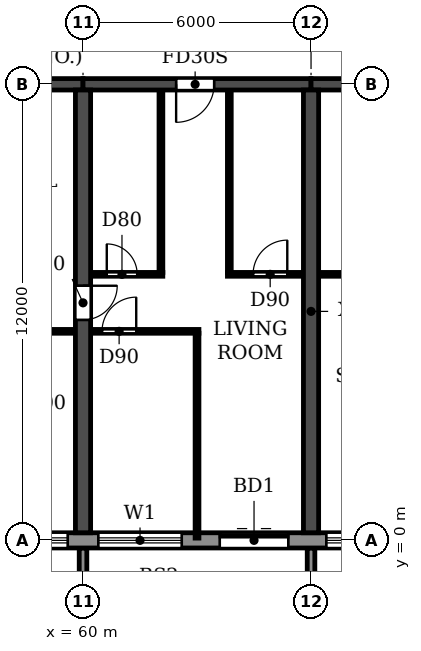
"""IFC4 building model, lengths in metres.
Left out: names, types, materials, properties, quantities, classifications, styles, units other than length and angle.
Written with IfcOpenShell. Run it as: python <this file> out.ifc"""

import sys

from ifc_helpers import new_model, si_unit, direction, frame, frame_2d, origin, place, context, subcontext, project, spatial, polyline, rectangle, outline, extrude, source, transform, mapped, element, fill, save


model = new_model("IFC4")
c1 = context("Model", 3, precision=1e-05, world=origin(), true_north=direction((0.0, 1.0)))
c2 = subcontext(c1, "Body", "Model", "MODEL_VIEW")
j1 = project(units=[si_unit("LENGTHUNIT", "METRE"), si_unit("PLANEANGLEUNIT", "RADIAN")], contexts=[c1])
p1 = place(None, origin())
s1 = spatial("IfcSite", under=j1, at=p1, CompositionType="ELEMENT")
p2 = place(p1, origin())
s2 = spatial("IfcBuilding", under=s1, at=p2, CompositionType="ELEMENT")
p3 = place(p2, frame((0.0, 0.0, 26.7)))
s3 = spatial("IfcBuildingStorey", under=s2, at=p3, CompositionType="ELEMENT", Elevation=26.7)
p4 = place(p3, frame((60.0, 0.2, 0.0), z_axis=(0.0, 0.0, 1.0), x_axis=(0.0, 1.0, 0.0)))
e1 = element("IfcWall", 1, at=p4, inside=s3, PredefinedType="SHEAR", context=c2, shape_type="SweptSolid", body=[
    extrude(rectangle(XDim=11.65, YDim=0.4, at=frame_2d((5.825, 0.0))), origin(), (0.0, 0.0, 1.0), 3.05),
])
p5 = place(p4, frame((5.6, 0.0, 0.0)))
e2 = element("IfcOpeningElement", 2, at=p5, cuts=e1, PredefinedType="OPENING", context=c2, shape_type="SweptSolid", body=[
    extrude(rectangle(XDim=0.9, YDim=2.1, at=frame_2d((0.45, 1.05))), frame((0.0, 0.21, 0.0), z_axis=(0.0, -1.0, 0.0), x_axis=(1.0, 0.0, 0.0)), (0.0, 0.0, 1.0), 0.42),
])
p6 = place(p3, frame((66.0, 0.2, 0.0), z_axis=(0.0, 0.0, 1.0), x_axis=(0.0, 1.0, 0.0)))
e3 = element("IfcWall", 3, at=p6, inside=s3, PredefinedType="SHEAR", context=c2, shape_type="SweptSolid", body=[
    extrude(rectangle(XDim=11.65, YDim=0.4, at=frame_2d((5.825, 0.0))), origin(), (0.0, 0.0, 1.0), 3.05),
])
p7 = place(p3, frame((54.0, 12.0, 0.0), z_axis=(0.0, 0.0, 1.0), x_axis=(1.0, 0.0, 0.0)))
e4 = element("IfcWall", 4, at=p7, inside=s3, PredefinedType="SHEAR", context=c2, shape_type="SweptSolid", body=[
    extrude(rectangle(XDim=6.0, YDim=0.3, at=frame_2d((3.0, 0.0))), origin(), (0.0, 0.0, 1.0), 2.45),
])
p8 = place(p3, frame((60.0, 12.0, 0.0), z_axis=(0.0, 0.0, 1.0), x_axis=(1.0, 0.0, 0.0)))
e5 = element("IfcWall", 5, at=p8, inside=s3, PredefinedType="SHEAR", context=c2, shape_type="SweptSolid", body=[
    extrude(rectangle(XDim=6.0, YDim=0.3, at=frame_2d((3.0, 0.0))), origin(), (0.0, 0.0, 1.0), 2.45),
])
p9 = place(p8, frame((2.45, 0.0, 0.0)))
e6 = element("IfcOpeningElement", 6, at=p9, cuts=e5, PredefinedType="OPENING", context=c2, shape_type="SweptSolid", body=[
    extrude(rectangle(XDim=1.0, YDim=2.1, at=frame_2d((0.5, 1.05))), frame((0.0, 0.16, 0.0), z_axis=(0.0, -1.0, 0.0), x_axis=(1.0, 0.0, 0.0)), (0.0, 0.0, 1.0), 0.32),
])
p10 = place(p3, frame((66.0, 12.0, 0.0), z_axis=(0.0, 0.0, 1.0), x_axis=(1.0, 0.0, 0.0)))
e7 = element("IfcWall", 7, at=p10, inside=s3, PredefinedType="SHEAR", context=c2, shape_type="SweptSolid", body=[
    extrude(rectangle(XDim=6.0, YDim=0.3, at=frame_2d((3.0, 0.0))), origin(), (0.0, 0.0, 1.0), 2.45),
])
p11 = place(p10, frame((2.45, 0.0, 0.0)))
e8 = element("IfcOpeningElement", 8, at=p11, cuts=e7, PredefinedType="OPENING", context=c2, shape_type="SweptSolid", body=[
    extrude(rectangle(XDim=1.0, YDim=2.1, at=frame_2d((0.5, 1.05))), frame((0.0, 0.16, 0.0), z_axis=(0.0, -1.0, 0.0), x_axis=(1.0, 0.0, 0.0)), (0.0, 0.0, 1.0), 0.32),
])
p12 = place(p3, frame((4.683, 0.0, 0.0), z_axis=(0.0, 0.0, 1.0), x_axis=(1.0, 0.0, 0.0)))
e9 = element("IfcWall", 9, at=p12, inside=s3, PredefinedType="STANDARD", context=c2, shape_type="SweptSolid", body=[
    extrude(rectangle(XDim=92.634, YDim=0.4, at=frame_2d((46.317, 0.0))), origin(), (0.0, 0.0, 1.0), 3.05),
])
p13 = place(p12, frame((1.717, 0.0, 0.9)))
e10 = element("IfcOpeningElement", 10, at=p13, cuts=e9, PredefinedType="OPENING", context=c2, shape_type="SweptSolid", body=[
    extrude(rectangle(XDim=2.2, YDim=1.5, at=frame_2d((1.1, 0.75))), frame((0.0, 0.21, 0.0), z_axis=(0.0, -1.0, 0.0), x_axis=(1.0, 0.0, 0.0)), (0.0, 0.0, 1.0), 0.42),
])
p14 = place(p12, frame((4.717, 0.0, 0.9)))
e11 = element("IfcOpeningElement", 11, at=p14, cuts=e9, PredefinedType="OPENING", context=c2, shape_type="SweptSolid", body=[
    extrude(rectangle(XDim=2.2, YDim=1.5, at=frame_2d((1.1, 0.75))), frame((0.0, 0.21, 0.0), z_axis=(0.0, -1.0, 0.0), x_axis=(1.0, 0.0, 0.0)), (0.0, 0.0, 1.0), 0.42),
])
p15 = place(p12, frame((7.717, 0.0, 0.9)))
e12 = element("IfcOpeningElement", 12, at=p15, cuts=e9, PredefinedType="OPENING", context=c2, shape_type="SweptSolid", body=[
    extrude(rectangle(XDim=2.2, YDim=1.5, at=frame_2d((1.1, 0.75))), frame((0.0, 0.21, 0.0), z_axis=(0.0, -1.0, 0.0), x_axis=(1.0, 0.0, 0.0)), (0.0, 0.0, 1.0), 0.42),
])
p16 = place(p12, frame((10.717, 0.0, 0.9)))
e13 = element("IfcOpeningElement", 13, at=p16, cuts=e9, PredefinedType="OPENING", context=c2, shape_type="SweptSolid", body=[
    extrude(rectangle(XDim=2.2, YDim=1.5, at=frame_2d((1.1, 0.75))), frame((0.0, 0.21, 0.0), z_axis=(0.0, -1.0, 0.0), x_axis=(1.0, 0.0, 0.0)), (0.0, 0.0, 1.0), 0.42),
])
p17 = place(p12, frame((13.717, 0.0, 0.9)))
e14 = element("IfcOpeningElement", 14, at=p17, cuts=e9, PredefinedType="OPENING", context=c2, shape_type="SweptSolid", body=[
    extrude(rectangle(XDim=2.2, YDim=1.5, at=frame_2d((1.1, 0.75))), frame((0.0, 0.21, 0.0), z_axis=(0.0, -1.0, 0.0), x_axis=(1.0, 0.0, 0.0)), (0.0, 0.0, 1.0), 0.42),
])
p18 = place(p12, frame((16.717, 0.0, 0.9)))
e15 = element("IfcOpeningElement", 15, at=p18, cuts=e9, PredefinedType="OPENING", context=c2, shape_type="SweptSolid", body=[
    extrude(rectangle(XDim=2.2, YDim=1.5, at=frame_2d((1.1, 0.75))), frame((0.0, 0.21, 0.0), z_axis=(0.0, -1.0, 0.0), x_axis=(1.0, 0.0, 0.0)), (0.0, 0.0, 1.0), 0.42),
])
p19 = place(p12, frame((19.917, 0.0, 0.0)))
e16 = element("IfcOpeningElement", 16, at=p19, cuts=e9, PredefinedType="OPENING", context=c2, shape_type="SweptSolid", body=[
    extrude(rectangle(XDim=1.8, YDim=2.4, at=frame_2d((0.9, 1.2))), frame((0.0, 0.21, 0.0), z_axis=(0.0, -1.0, 0.0), x_axis=(1.0, 0.0, 0.0)), (0.0, 0.0, 1.0), 0.42),
])
p20 = place(p12, frame((22.717, 0.0, 0.9)))
e17 = element("IfcOpeningElement", 17, at=p20, cuts=e9, PredefinedType="OPENING", context=c2, shape_type="SweptSolid", body=[
    extrude(rectangle(XDim=2.2, YDim=1.5, at=frame_2d((1.1, 0.75))), frame((0.0, 0.21, 0.0), z_axis=(0.0, -1.0, 0.0), x_axis=(1.0, 0.0, 0.0)), (0.0, 0.0, 1.0), 0.42),
])
p21 = place(p12, frame((25.717, 0.0, 0.9)))
e18 = element("IfcOpeningElement", 18, at=p21, cuts=e9, PredefinedType="OPENING", context=c2, shape_type="SweptSolid", body=[
    extrude(rectangle(XDim=2.2, YDim=1.5, at=frame_2d((1.1, 0.75))), frame((0.0, 0.21, 0.0), z_axis=(0.0, -1.0, 0.0), x_axis=(1.0, 0.0, 0.0)), (0.0, 0.0, 1.0), 0.42),
])
p22 = place(p12, frame((28.717, 0.0, 0.9)))
e19 = element("IfcOpeningElement", 19, at=p22, cuts=e9, PredefinedType="OPENING", context=c2, shape_type="SweptSolid", body=[
    extrude(rectangle(XDim=2.2, YDim=1.5, at=frame_2d((1.1, 0.75))), frame((0.0, 0.21, 0.0), z_axis=(0.0, -1.0, 0.0), x_axis=(1.0, 0.0, 0.0)), (0.0, 0.0, 1.0), 0.42),
])
p23 = place(p12, frame((31.917, 0.0, 0.0)))
e20 = element("IfcOpeningElement", 20, at=p23, cuts=e9, PredefinedType="OPENING", context=c2, shape_type="SweptSolid", body=[
    extrude(rectangle(XDim=1.8, YDim=2.4, at=frame_2d((0.9, 1.2))), frame((0.0, 0.21, 0.0), z_axis=(0.0, -1.0, 0.0), x_axis=(1.0, 0.0, 0.0)), (0.0, 0.0, 1.0), 0.42),
])
p24 = place(p12, frame((34.717, 0.0, 0.9)))
e21 = element("IfcOpeningElement", 21, at=p24, cuts=e9, PredefinedType="OPENING", context=c2, shape_type="SweptSolid", body=[
    extrude(rectangle(XDim=2.2, YDim=1.5, at=frame_2d((1.1, 0.75))), frame((0.0, 0.21, 0.0), z_axis=(0.0, -1.0, 0.0), x_axis=(1.0, 0.0, 0.0)), (0.0, 0.0, 1.0), 0.42),
])
p25 = place(p12, frame((37.717, 0.0, 0.9)))
e22 = element("IfcOpeningElement", 22, at=p25, cuts=e9, PredefinedType="OPENING", context=c2, shape_type="SweptSolid", body=[
    extrude(rectangle(XDim=2.2, YDim=1.5, at=frame_2d((1.1, 0.75))), frame((0.0, 0.21, 0.0), z_axis=(0.0, -1.0, 0.0), x_axis=(1.0, 0.0, 0.0)), (0.0, 0.0, 1.0), 0.42),
])
p26 = place(p12, frame((40.717, 0.0, 0.9)))
e23 = element("IfcOpeningElement", 23, at=p26, cuts=e9, PredefinedType="OPENING", context=c2, shape_type="SweptSolid", body=[
    extrude(rectangle(XDim=2.2, YDim=1.5, at=frame_2d((1.1, 0.75))), frame((0.0, 0.21, 0.0), z_axis=(0.0, -1.0, 0.0), x_axis=(1.0, 0.0, 0.0)), (0.0, 0.0, 1.0), 0.42),
])
p27 = place(p12, frame((43.917, 0.0, 0.0)))
e24 = element("IfcOpeningElement", 24, at=p27, cuts=e9, PredefinedType="OPENING", context=c2, shape_type="SweptSolid", body=[
    extrude(rectangle(XDim=1.8, YDim=2.4, at=frame_2d((0.9, 1.2))), frame((0.0, 0.21, 0.0), z_axis=(0.0, -1.0, 0.0), x_axis=(1.0, 0.0, 0.0)), (0.0, 0.0, 1.0), 0.42),
])
p28 = place(p12, frame((46.717, 0.0, 0.9)))
e25 = element("IfcOpeningElement", 25, at=p28, cuts=e9, PredefinedType="OPENING", context=c2, shape_type="SweptSolid", body=[
    extrude(rectangle(XDim=2.2, YDim=1.5, at=frame_2d((1.1, 0.75))), frame((0.0, 0.21, 0.0), z_axis=(0.0, -1.0, 0.0), x_axis=(1.0, 0.0, 0.0)), (0.0, 0.0, 1.0), 0.42),
])
p29 = place(p12, frame((49.717, 0.0, 0.9)))
e26 = element("IfcOpeningElement", 26, at=p29, cuts=e9, PredefinedType="OPENING", context=c2, shape_type="SweptSolid", body=[
    extrude(rectangle(XDim=2.2, YDim=1.5, at=frame_2d((1.1, 0.75))), frame((0.0, 0.21, 0.0), z_axis=(0.0, -1.0, 0.0), x_axis=(1.0, 0.0, 0.0)), (0.0, 0.0, 1.0), 0.42),
])
p30 = place(p12, frame((52.717, 0.0, 0.9)))
e27 = element("IfcOpeningElement", 27, at=p30, cuts=e9, PredefinedType="OPENING", context=c2, shape_type="SweptSolid", body=[
    extrude(rectangle(XDim=2.2, YDim=1.5, at=frame_2d((1.1, 0.75))), frame((0.0, 0.21, 0.0), z_axis=(0.0, -1.0, 0.0), x_axis=(1.0, 0.0, 0.0)), (0.0, 0.0, 1.0), 0.42),
])
p31 = place(p12, frame((55.717, 0.0, 0.9)))
e28 = element("IfcOpeningElement", 28, at=p31, cuts=e9, PredefinedType="OPENING", context=c2, shape_type="SweptSolid", body=[
    extrude(rectangle(XDim=2.2, YDim=1.5, at=frame_2d((1.1, 0.75))), frame((0.0, 0.21, 0.0), z_axis=(0.0, -1.0, 0.0), x_axis=(1.0, 0.0, 0.0)), (0.0, 0.0, 1.0), 0.42),
])
p32 = place(p12, frame((58.917, 0.0, 0.0)))
e29 = element("IfcOpeningElement", 29, at=p32, cuts=e9, PredefinedType="OPENING", context=c2, shape_type="SweptSolid", body=[
    extrude(rectangle(XDim=1.8, YDim=2.4, at=frame_2d((0.9, 1.2))), frame((0.0, 0.21, 0.0), z_axis=(0.0, -1.0, 0.0), x_axis=(1.0, 0.0, 0.0)), (0.0, 0.0, 1.0), 0.42),
])
p33 = place(p12, frame((61.717, 0.0, 0.9)))
e30 = element("IfcOpeningElement", 30, at=p33, cuts=e9, PredefinedType="OPENING", context=c2, shape_type="SweptSolid", body=[
    extrude(rectangle(XDim=2.2, YDim=1.5, at=frame_2d((1.1, 0.75))), frame((0.0, 0.21, 0.0), z_axis=(0.0, -1.0, 0.0), x_axis=(1.0, 0.0, 0.0)), (0.0, 0.0, 1.0), 0.42),
])
p34 = place(p12, frame((64.717, 0.0, 0.9)))
e31 = element("IfcOpeningElement", 31, at=p34, cuts=e9, PredefinedType="OPENING", context=c2, shape_type="SweptSolid", body=[
    extrude(rectangle(XDim=2.2, YDim=1.5, at=frame_2d((1.1, 0.75))), frame((0.0, 0.21, 0.0), z_axis=(0.0, -1.0, 0.0), x_axis=(1.0, 0.0, 0.0)), (0.0, 0.0, 1.0), 0.42),
])
p35 = place(p12, frame((67.717, 0.0, 0.9)))
e32 = element("IfcOpeningElement", 32, at=p35, cuts=e9, PredefinedType="OPENING", context=c2, shape_type="SweptSolid", body=[
    extrude(rectangle(XDim=2.2, YDim=1.5, at=frame_2d((1.1, 0.75))), frame((0.0, 0.21, 0.0), z_axis=(0.0, -1.0, 0.0), x_axis=(1.0, 0.0, 0.0)), (0.0, 0.0, 1.0), 0.42),
])
p36 = place(p12, frame((70.917, 0.0, 0.0)))
e33 = element("IfcOpeningElement", 33, at=p36, cuts=e9, PredefinedType="OPENING", context=c2, shape_type="SweptSolid", body=[
    extrude(rectangle(XDim=1.8, YDim=2.4, at=frame_2d((0.9, 1.2))), frame((0.0, 0.21, 0.0), z_axis=(0.0, -1.0, 0.0), x_axis=(1.0, 0.0, 0.0)), (0.0, 0.0, 1.0), 0.42),
])
p37 = place(p12, frame((73.717, 0.0, 0.9)))
e34 = element("IfcOpeningElement", 34, at=p37, cuts=e9, PredefinedType="OPENING", context=c2, shape_type="SweptSolid", body=[
    extrude(rectangle(XDim=2.2, YDim=1.5, at=frame_2d((1.1, 0.75))), frame((0.0, 0.21, 0.0), z_axis=(0.0, -1.0, 0.0), x_axis=(1.0, 0.0, 0.0)), (0.0, 0.0, 1.0), 0.42),
])
p38 = place(p12, frame((76.717, 0.0, 0.9)))
e35 = element("IfcOpeningElement", 35, at=p38, cuts=e9, PredefinedType="OPENING", context=c2, shape_type="SweptSolid", body=[
    extrude(rectangle(XDim=2.2, YDim=1.5, at=frame_2d((1.1, 0.75))), frame((0.0, 0.21, 0.0), z_axis=(0.0, -1.0, 0.0), x_axis=(1.0, 0.0, 0.0)), (0.0, 0.0, 1.0), 0.42),
])
p39 = place(p12, frame((79.717, 0.0, 0.9)))
e36 = element("IfcOpeningElement", 36, at=p39, cuts=e9, PredefinedType="OPENING", context=c2, shape_type="SweptSolid", body=[
    extrude(rectangle(XDim=2.2, YDim=1.5, at=frame_2d((1.1, 0.75))), frame((0.0, 0.21, 0.0), z_axis=(0.0, -1.0, 0.0), x_axis=(1.0, 0.0, 0.0)), (0.0, 0.0, 1.0), 0.42),
])
p40 = place(p12, frame((82.717, 0.0, 0.9)))
e37 = element("IfcOpeningElement", 37, at=p40, cuts=e9, PredefinedType="OPENING", context=c2, shape_type="SweptSolid", body=[
    extrude(rectangle(XDim=2.2, YDim=1.5, at=frame_2d((1.1, 0.75))), frame((0.0, 0.21, 0.0), z_axis=(0.0, -1.0, 0.0), x_axis=(1.0, 0.0, 0.0)), (0.0, 0.0, 1.0), 0.42),
])
p41 = place(p12, frame((85.717, 0.0, 0.9)))
e38 = element("IfcOpeningElement", 38, at=p41, cuts=e9, PredefinedType="OPENING", context=c2, shape_type="SweptSolid", body=[
    extrude(rectangle(XDim=2.2, YDim=1.5, at=frame_2d((1.1, 0.75))), frame((0.0, 0.21, 0.0), z_axis=(0.0, -1.0, 0.0), x_axis=(1.0, 0.0, 0.0)), (0.0, 0.0, 1.0), 0.42),
])
p42 = place(p12, frame((88.717, 0.0, 0.9)))
e39 = element("IfcOpeningElement", 39, at=p42, cuts=e9, PredefinedType="OPENING", context=c2, shape_type="SweptSolid", body=[
    extrude(rectangle(XDim=2.2, YDim=1.5, at=frame_2d((1.1, 0.75))), frame((0.0, 0.21, 0.0), z_axis=(0.0, -1.0, 0.0), x_axis=(1.0, 0.0, 0.0)), (0.0, 0.0, 1.0), 0.42),
])
m1 = source(origin(), c2, "Body", "SweptSolid", [
    extrude(outline(polyline([(0.0, 0.0), (0.2, 0.0), (0.2, 1.65), (0.0, 1.65), (0.0, 0.0)])), origin(), (0.0, 0.0, 1.0), 3.1),
])
for number, where in (
    (40, (59.9, -1.85, 0.0)),
    (41, (65.9, -1.85, 0.0)),
):
    element("IfcWall", number, at=place(p3, frame(where)), inside=s3, PredefinedType="STANDARD", context=c2, shape_type="MappedRepresentation", body=[
        mapped(m1, transform((0.0, 0.0, 0.0))),
    ])
p43 = place(p3, frame((54.21, 5.5, 0.0), z_axis=(0.0, 0.0, 1.0), x_axis=(1.0, 0.0, 0.0)))
e42 = element("IfcWall", 42, at=p43, inside=s3, PredefinedType="PARTITIONING", context=c2, shape_type="SweptSolid", body=[
    extrude(rectangle(XDim=5.58, YDim=0.1, at=frame_2d((2.79, 0.0))), origin(), (0.0, 0.0, 1.0), 3.05),
])
p44 = place(p43, frame((1.39, 0.0, 0.0)))
e43 = element("IfcOpeningElement", 43, at=p44, cuts=e42, PredefinedType="OPENING", context=c2, shape_type="SweptSolid", body=[
    extrude(rectangle(XDim=0.9, YDim=2.1, at=frame_2d((0.45, 1.05))), frame((0.0, 0.06, 0.0), z_axis=(0.0, -1.0, 0.0), x_axis=(1.0, 0.0, 0.0)), (0.0, 0.0, 1.0), 0.12),
])
p45 = place(p43, frame((3.29, 0.0, 0.0)))
e44 = element("IfcOpeningElement", 44, at=p45, cuts=e42, PredefinedType="OPENING", context=c2, shape_type="SweptSolid", body=[
    extrude(rectangle(XDim=0.9, YDim=2.1, at=frame_2d((0.45, 1.05))), frame((0.0, 0.06, 0.0), z_axis=(0.0, -1.0, 0.0), x_axis=(1.0, 0.0, 0.0)), (0.0, 0.0, 1.0), 0.12),
])
p46 = place(p3, frame((60.21, 5.5, 0.0), z_axis=(0.0, 0.0, 1.0), x_axis=(1.0, 0.0, 0.0)))
e45 = element("IfcWall", 45, at=p46, inside=s3, PredefinedType="PARTITIONING", context=c2, shape_type="SweptSolid", body=[
    extrude(rectangle(XDim=2.84, YDim=0.1, at=frame_2d((1.42, 0.0))), origin(), (0.0, 0.0, 1.0), 3.05),
])
p47 = place(p46, frame((0.29, 0.0, 0.0)))
e46 = element("IfcOpeningElement", 46, at=p47, cuts=e45, PredefinedType="OPENING", context=c2, shape_type="SweptSolid", body=[
    extrude(rectangle(XDim=0.9, YDim=2.1, at=frame_2d((0.45, 1.05))), frame((0.0, 0.06, 0.0), z_axis=(0.0, -1.0, 0.0), x_axis=(1.0, 0.0, 0.0)), (0.0, 0.0, 1.0), 0.12),
])
p48 = place(p3, frame((60.21, 7.0, 0.0), z_axis=(0.0, 0.0, 1.0), x_axis=(1.0, 0.0, 0.0)))
e47 = element("IfcWall", 47, at=p48, inside=s3, PredefinedType="PARTITIONING", context=c2, shape_type="SweptSolid", body=[
    extrude(rectangle(XDim=1.89, YDim=0.1, at=frame_2d((0.945, 0.0))), origin(), (0.0, 0.0, 1.0), 3.05),
])
p49 = place(p48, frame((0.415, 0.0, 0.0)))
e48 = element("IfcOpeningElement", 48, at=p49, cuts=e47, PredefinedType="OPENING", context=c2, shape_type="SweptSolid", body=[
    extrude(rectangle(XDim=0.8, YDim=2.1, at=frame_2d((0.4, 1.05))), frame((0.0, 0.06, 0.0), z_axis=(0.0, -1.0, 0.0), x_axis=(1.0, 0.0, 0.0)), (0.0, 0.0, 1.0), 0.12),
])
p50 = place(p3, frame((63.8, 7.0, 0.0), z_axis=(0.0, 0.0, 1.0), x_axis=(1.0, 0.0, 0.0)))
e49 = element("IfcWall", 49, at=p50, inside=s3, PredefinedType="PARTITIONING", context=c2, shape_type="SweptSolid", body=[
    extrude(rectangle(XDim=1.99, YDim=0.1, at=frame_2d((0.995, 0.0))), origin(), (0.0, 0.0, 1.0), 3.05),
])
p51 = place(p50, frame((0.675, 0.0, 0.0)))
e50 = element("IfcOpeningElement", 50, at=p51, cuts=e49, PredefinedType="OPENING", context=c2, shape_type="SweptSolid", body=[
    extrude(rectangle(XDim=0.9, YDim=2.1, at=frame_2d((0.45, 1.05))), frame((0.0, 0.06, 0.0), z_axis=(0.0, -1.0, 0.0), x_axis=(1.0, 0.0, 0.0)), (0.0, 0.0, 1.0), 0.12),
])
p52 = place(p3, frame((66.21, 7.0, 0.0), z_axis=(0.0, 0.0, 1.0), x_axis=(1.0, 0.0, 0.0)))
e51 = element("IfcWall", 51, at=p52, inside=s3, PredefinedType="PARTITIONING", context=c2, shape_type="SweptSolid", body=[
    extrude(rectangle(XDim=1.89, YDim=0.1, at=frame_2d((0.945, 0.0))), origin(), (0.0, 0.0, 1.0), 3.05),
])
p53 = place(p3, frame((62.05, 7.05, 0.0), z_axis=(0.0, 0.0, 1.0), x_axis=(0.0, 1.0, 0.0)))
e52 = element("IfcWall", 52, at=p53, inside=s3, PredefinedType="PARTITIONING", context=c2, shape_type="SweptSolid", body=[
    extrude(rectangle(XDim=4.79, YDim=0.1, at=frame_2d((2.395, 0.0))), origin(), (0.0, 0.0, 1.0), 3.05),
])
p54 = place(p3, frame((63.0, 0.06, 0.0), z_axis=(0.0, 0.0, 1.0), x_axis=(0.0, 1.0, 0.0)))
e53 = element("IfcWall", 53, at=p54, inside=s3, PredefinedType="PARTITIONING", context=c2, shape_type="SweptSolid", body=[
    extrude(rectangle(XDim=5.39, YDim=0.1, at=frame_2d((2.695, 0.0))), origin(), (0.0, 0.0, 1.0), 3.05),
])
p55 = place(p3, frame((63.85, 7.05, 0.0), z_axis=(0.0, 0.0, 1.0), x_axis=(0.0, 1.0, 0.0)))
e54 = element("IfcWall", 54, at=p55, inside=s3, PredefinedType="PARTITIONING", context=c2, shape_type="SweptSolid", body=[
    extrude(rectangle(XDim=4.79, YDim=0.1, at=frame_2d((2.395, 0.0))), origin(), (0.0, 0.0, 1.0), 3.05),
])
p56 = place(p30, origin())
e55 = element("IfcWindow", 55, at=p56, inside=s3, PartitioningType="DOUBLE_PANEL_HORIZONTAL", PredefinedType="WINDOW", context=c2, shape_type="SweptSolid", body=[
    extrude(rectangle(XDim=2.2, YDim=1.5, at=frame_2d((1.1, 0.75))), frame((0.0, 0.03, 0.0), z_axis=(0.0, -1.0, 0.0), x_axis=(1.0, 0.0, 0.0)), (0.0, 0.0, 1.0), 0.06),
])
fill(e27, e55)
p57 = place(p31, origin())
e56 = element("IfcWindow", 56, at=p57, inside=s3, PartitioningType="DOUBLE_PANEL_HORIZONTAL", PredefinedType="WINDOW", context=c2, shape_type="SweptSolid", body=[
    extrude(rectangle(XDim=2.2, YDim=1.5, at=frame_2d((1.1, 0.75))), frame((0.0, 0.03, 0.0), z_axis=(0.0, -1.0, 0.0), x_axis=(1.0, 0.0, 0.0)), (0.0, 0.0, 1.0), 0.06),
])
fill(e28, e56)
p58 = place(p32, origin())
e57 = element("IfcDoor", 57, at=p58, inside=s3, OperationType="DOUBLE_DOOR_SLIDING", PredefinedType="DOOR", context=c2, shape_type="SweptSolid", body=[
    extrude(rectangle(XDim=1.8, YDim=2.4, at=frame_2d((0.9, 1.2))), frame((0.0, 0.025, 0.0), z_axis=(0.0, -1.0, 0.0), x_axis=(1.0, 0.0, 0.0)), (0.0, 0.0, 1.0), 0.05),
])
fill(e29, e57)
p59 = place(p33, origin())
e58 = element("IfcWindow", 58, at=p59, inside=s3, PartitioningType="DOUBLE_PANEL_HORIZONTAL", PredefinedType="WINDOW", context=c2, shape_type="SweptSolid", body=[
    extrude(rectangle(XDim=2.2, YDim=1.5, at=frame_2d((1.1, 0.75))), frame((0.0, 0.03, 0.0), z_axis=(0.0, -1.0, 0.0), x_axis=(1.0, 0.0, 0.0)), (0.0, 0.0, 1.0), 0.06),
])
fill(e30, e58)
p60 = place(p5, frame((0.9, 0.0, 0.0), z_axis=(0.0, 0.0, 1.0), x_axis=(-1.0, 0.0, 0.0)))
e59 = element("IfcDoor", 59, at=p60, inside=s3, OperationType="SINGLE_SWING_LEFT", PredefinedType="DOOR", context=c2, shape_type="SweptSolid", body=[
    extrude(rectangle(XDim=0.9, YDim=2.1, at=frame_2d((0.45, 1.05))), frame((0.0, 0.025, 0.0), z_axis=(0.0, -1.0, 0.0), x_axis=(1.0, 0.0, 0.0)), (0.0, 0.0, 1.0), 0.05),
])
fill(e2, e59)
p61 = place(p47, origin())
e60 = element("IfcDoor", 60, at=p61, inside=s3, OperationType="SINGLE_SWING_RIGHT", PredefinedType="DOOR", context=c2, shape_type="SweptSolid", body=[
    extrude(rectangle(XDim=0.9, YDim=2.1, at=frame_2d((0.45, 1.05))), frame((0.0, 0.025, 0.0), z_axis=(0.0, -1.0, 0.0), x_axis=(1.0, 0.0, 0.0)), (0.0, 0.0, 1.0), 0.05),
])
fill(e46, e60)
p62 = place(p49, origin())
e61 = element("IfcDoor", 61, at=p62, inside=s3, OperationType="SINGLE_SWING_LEFT", PredefinedType="DOOR", context=c2, shape_type="SweptSolid", body=[
    extrude(rectangle(XDim=0.8, YDim=2.1, at=frame_2d((0.4, 1.05))), frame((0.0, 0.025, 0.0), z_axis=(0.0, -1.0, 0.0), x_axis=(1.0, 0.0, 0.0)), (0.0, 0.0, 1.0), 0.05),
])
fill(e48, e61)
p63 = place(p9, frame((1.0, 0.0, 0.0), z_axis=(0.0, 0.0, 1.0), x_axis=(-1.0, 0.0, 0.0)))
e62 = element("IfcDoor", 62, at=p63, inside=s3, OperationType="SINGLE_SWING_RIGHT", PredefinedType="DOOR", context=c2, shape_type="SweptSolid", body=[
    extrude(rectangle(XDim=1.0, YDim=2.1, at=frame_2d((0.5, 1.05))), frame((0.0, 0.025, 0.0), z_axis=(0.0, -1.0, 0.0), x_axis=(1.0, 0.0, 0.0)), (0.0, 0.0, 1.0), 0.05),
])
fill(e6, e62)
p64 = place(p51, origin())
e63 = element("IfcDoor", 63, at=p64, inside=s3, OperationType="SINGLE_SWING_RIGHT", PredefinedType="DOOR", context=c2, shape_type="SweptSolid", body=[
    extrude(rectangle(XDim=0.9, YDim=2.1, at=frame_2d((0.45, 1.05))), frame((0.0, 0.025, 0.0), z_axis=(0.0, -1.0, 0.0), x_axis=(1.0, 0.0, 0.0)), (0.0, 0.0, 1.0), 0.05),
])
fill(e50, e63)
save(model, sys.argv[1])
